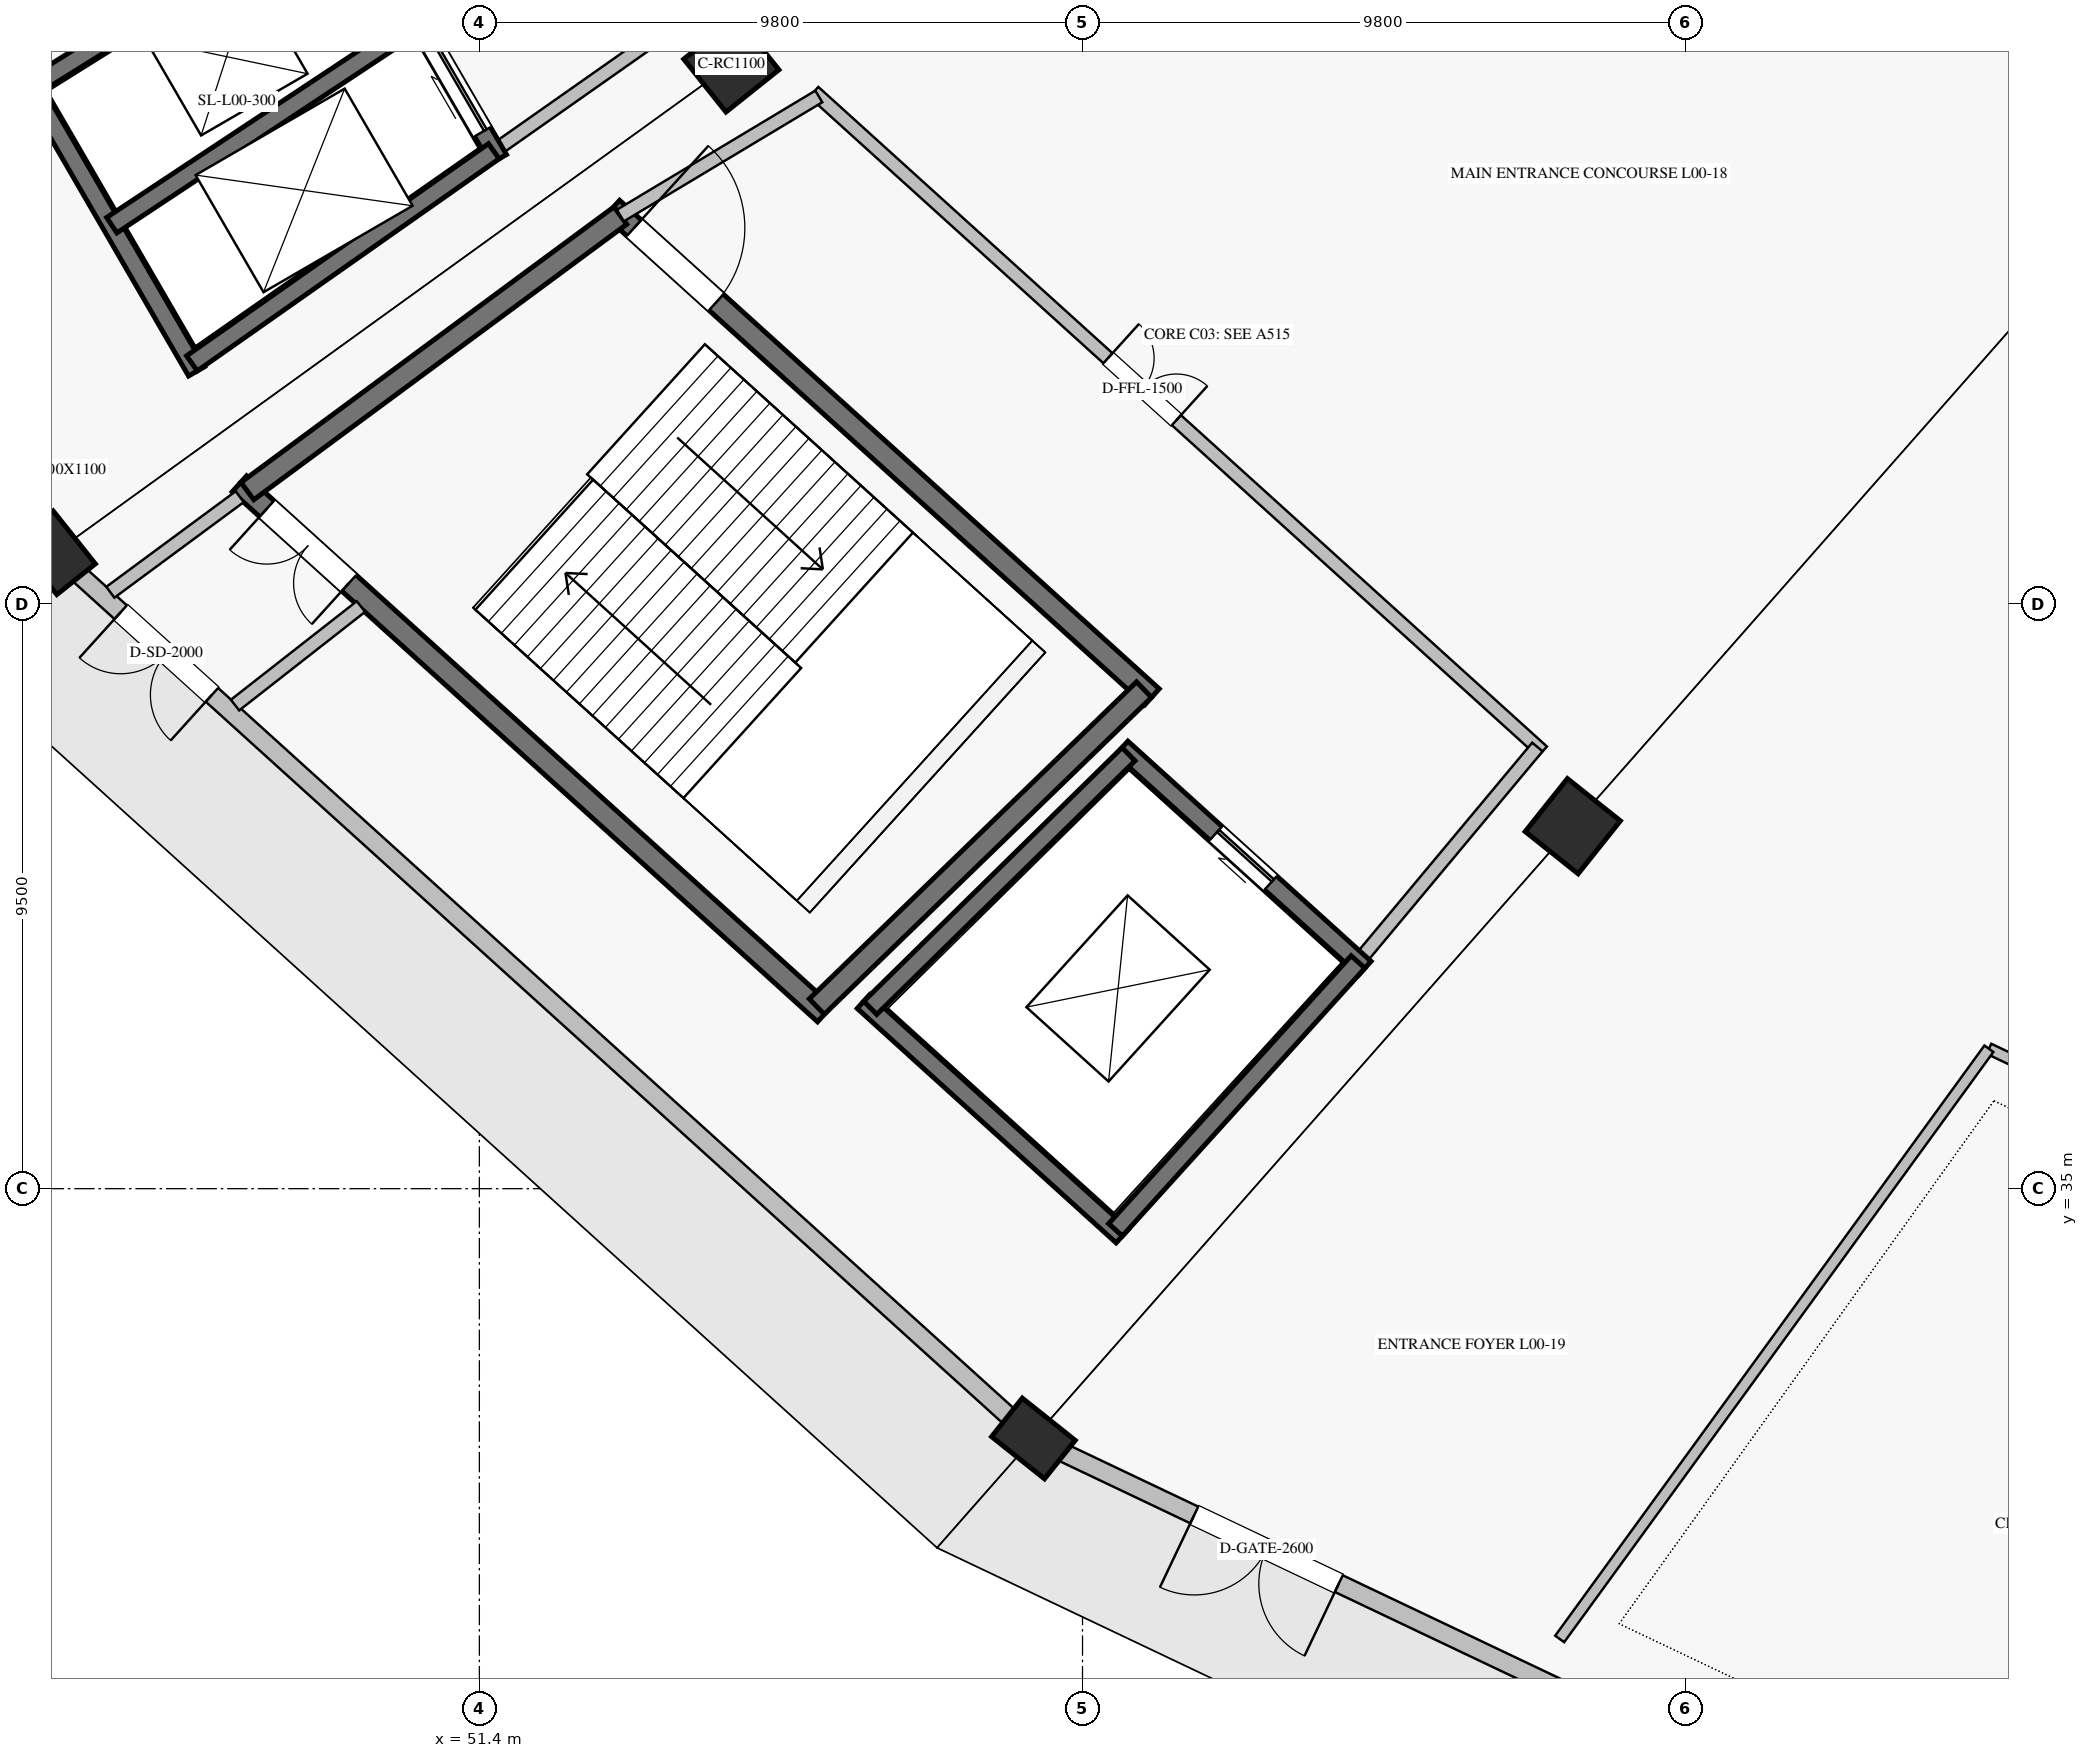
"""IFC4 building model, lengths in metres.
Left out: names, types, materials, properties, quantities, classifications, styles, units other than length and angle.
Written with IfcOpenShell. Run it as: python <this file> out.ifc"""

import sys

from ifc_helpers import new_model, si_unit, direction, frame, frame_2d, origin, origin_2d, place, context, subcontext, project, spatial, rectangle, extrude, element, fill, save


model = new_model("IFC4")
c1 = context("Model", 3, precision=1e-05, world=origin(), true_north=direction((0.0, 1.0)))
c2 = subcontext(c1, "Body", "Model", "MODEL_VIEW")
j1 = project(units=[si_unit("LENGTHUNIT", "METRE"), si_unit("PLANEANGLEUNIT", "RADIAN")], contexts=[c1])
p1 = place(None, origin())
s1 = spatial("IfcSite", under=j1, at=p1, CompositionType="ELEMENT")
p2 = place(p1, origin())
s2 = spatial("IfcBuilding", under=s1, at=p2, CompositionType="ELEMENT")
p3 = place(p2, origin())
s3 = spatial("IfcBuildingStorey", under=s2, at=p3, CompositionType="ELEMENT", Elevation=0.0)
for number, where, z_axis, x_axis in (
    (1, (55.494, 53.266, 0.0), (0.0, 0.0, 1.0), (-0.782, -0.623, 0.0)),
    (2, (69.166, 40.889, 0.0), (0.0, 0.0, 1.0), (-0.623, -0.782, 0.0)),
):
    element("IfcColumn", number, at=place(p3, frame(where, z_axis=z_axis, x_axis=x_axis)), inside=s3, PredefinedType="COLUMN", context=c2, shape_type="SweptSolid", body=[
        extrude(rectangle(XDim=1.1, YDim=1.1, at=origin_2d()), origin(), (0.0, 0.0, 1.0), 5.78),
    ])
for number, where, z_axis, x_axis in (
    (3, (44.505, 45.332, 0.0), (0.0, 0.0, 1.0), (-0.782, -0.623, 0.0)),
    (4, (60.402, 30.941, 0.0), (0.0, 0.0, 1.0), (-0.623, -0.782, 0.0)),
):
    element("IfcColumn", number, at=place(p3, frame(where, z_axis=z_axis, x_axis=x_axis)), inside=s3, PredefinedType="COLUMN", context=c2, shape_type="SweptSolid", body=[
        extrude(rectangle(XDim=0.8, YDim=1.1, at=origin_2d()), origin(), (0.0, 0.0, 1.0), 5.78),
    ])
p4 = place(p3, frame((44.794, 45.071, 0.0), z_axis=(0.0, 0.0, 1.0), x_axis=(0.741354093053, -0.671114080253, 0.0)))
e5 = element("IfcWall", 5, at=p4, inside=s3, PredefinedType="SOLIDWALL", context=c2, shape_type="SweptSolid", body=[
    extrude(rectangle(XDim=20.664, YDim=0.3, at=frame_2d((10.332, 0.0))), origin(), (0.0, 0.0, 1.0), 4.8),
])
p5 = place(p4, frame((1.05, 0.0, 0.0)))
e6 = element("IfcOpeningElement", 6, at=p5, cuts=e5, PredefinedType="OPENING", context=c2, shape_type="SweptSolid", body=[
    extrude(rectangle(XDim=2.0, YDim=2.3, at=frame_2d((1.0, 1.15))), frame((0.0, 0.16, 0.0), z_axis=(0.0, -1.0, 0.0), x_axis=(1.0, 0.0, 0.0)), (0.0, 0.0, 1.0), 0.32),
])
p6 = place(p3, frame((60.754, 30.774, 0.0), z_axis=(0.0, 0.0, 1.0), x_axis=(0.903214032263, -0.429190414528, 0.0)))
e7 = element("IfcWall", 7, at=p6, inside=s3, PredefinedType="SOLIDWALL", context=c2, shape_type="SweptSolid", body=[
    extrude(rectangle(XDim=21.134, YDim=0.3, at=frame_2d((10.567, 0.0))), origin(), (0.0, 0.0, 1.0), 4.8),
])
p7 = place(p6, frame((2.504, 0.0, 0.0)))
e8 = element("IfcOpeningElement", 8, at=p7, cuts=e7, PredefinedType="OPENING", context=c2, shape_type="SweptSolid", body=[
    extrude(rectangle(XDim=2.6, YDim=2.4, at=frame_2d((1.3, 1.2))), frame((0.0, 0.16, 0.0), z_axis=(0.0, -1.0, 0.0), x_axis=(1.0, 0.0, 0.0)), (0.0, 0.0, 1.0), 0.32),
])
p8 = place(p6, frame((13.894, 0.0, 1.1)))
e9 = element("IfcOpeningElement", 9, at=p8, cuts=e7, PredefinedType="OPENING", context=c2, shape_type="SweptSolid", body=[
    extrude(rectangle(XDim=1.8, YDim=1.5, at=frame_2d((0.9, 0.75))), frame((0.0, 0.16, 0.0), z_axis=(0.0, -1.0, 0.0), x_axis=(1.0, 0.0, 0.0)), (0.0, 0.0, 1.0), 0.32),
])
p9 = place(p3, frame((49.739, 57.046, 0.0), z_axis=(0.0, 0.0, 1.0), x_axis=(-0.852334575619, -0.522996913188, 0.0)))
e10 = element("IfcWall", 10, at=p9, inside=s3, PredefinedType="SHEAR", context=c2, shape_type="SweptSolid", body=[
    extrude(rectangle(XDim=7.516, YDim=0.35, at=frame_2d((3.758, 0.0))), origin(), (0.0, 0.0, 1.0), 5.5),
])
p10 = place(p3, frame((49.123, 56.188, 0.0), z_axis=(0.0, 0.0, 1.0), x_axis=(0.501629534056, -0.86508254552, 0.0)))
e11 = element("IfcWall", 11, at=p10, inside=s3, PredefinedType="SHEAR", context=c2, shape_type="SweptSolid", body=[
    extrude(rectangle(XDim=5.157, YDim=0.3, at=frame_2d((2.579, 0.0))), origin(), (0.0, 0.0, 1.0), 5.5),
])
p11 = place(p10, frame((0.766, 0.0, 0.0)))
e12 = element("IfcOpeningElement", 12, at=p11, cuts=e11, PredefinedType="OPENING", context=c2, shape_type="SweptSolid", body=[
    extrude(rectangle(XDim=1.1, YDim=2.2, at=frame_2d((0.55, 1.1))), frame((0.0, 0.16, 0.0), z_axis=(0.0, -1.0, 0.0), x_axis=(1.0, 0.0, 0.0)), (0.0, 0.0, 1.0), 0.32),
])
p12 = place(p10, frame((3.042, 0.0, 0.0)))
e13 = element("IfcOpeningElement", 13, at=p12, cuts=e11, PredefinedType="OPENING", context=c2, shape_type="SweptSolid", body=[
    extrude(rectangle(XDim=1.6, YDim=2.3, at=frame_2d((0.8, 1.15))), frame((0.0, 0.16, 0.0), z_axis=(0.0, -1.0, 0.0), x_axis=(1.0, 0.0, 0.0)), (0.0, 0.0, 1.0), 0.32),
])
p13 = place(p3, frame((44.05, 53.03, 0.0), z_axis=(0.0, 0.0, 1.0), x_axis=(0.501596987756, -0.865101417103, 0.0)))
e14 = element("IfcWall", 14, at=p13, inside=s3, PredefinedType="SHEAR", context=c2, shape_type="SweptSolid", body=[
    extrude(rectangle(XDim=5.491, YDim=0.3, at=frame_2d((2.746, 0.0))), origin(), (0.0, 0.0, 1.0), 5.5),
])
p14 = place(p3, frame((49.198, 56.058, 0.0), z_axis=(0.0, 0.0, 1.0), x_axis=(-0.848938067893, -0.528492343257, 0.0)))
e15 = element("IfcWall", 15, at=p14, inside=s3, PredefinedType="SHEAR", context=c2, shape_type="SweptSolid", body=[
    extrude(rectangle(XDim=5.975, YDim=0.3, at=frame_2d((2.988, 0.0))), origin(), (0.0, 0.0, 1.0), 5.5),
])
p15 = place(p3, frame((51.635, 51.855, 0.0), z_axis=(0.0, 0.0, 1.0), x_axis=(-0.818205158105, -0.574926359851, 0.0)))
e16 = element("IfcWall", 16, at=p15, inside=s3, PredefinedType="SHEAR", context=c2, shape_type="SweptSolid", body=[
    extrude(rectangle(XDim=5.995, YDim=0.3, at=frame_2d((2.998, 0.0))), origin(), (0.0, 0.0, 1.0), 5.5),
])
p16 = place(p3, frame((50.417, 53.957, 0.0), z_axis=(0.0, 0.0, 1.0), x_axis=(-0.833878900042, -0.551947443209, 0.0)))
e17 = element("IfcWall", 17, at=p16, inside=s3, PredefinedType="SHEAR", context=c2, shape_type="SweptSolid", body=[
    extrude(rectangle(XDim=5.983, YDim=0.3, at=frame_2d((2.991, 0.0))), origin(), (0.0, 0.0, 1.0), 5.5),
])
p17 = place(p3, frame((54.8, 54.079, 0.0), z_axis=(0.0, 0.0, 1.0), x_axis=(-0.818225400643, -0.574897550649, 0.0)))
e18 = element("IfcWall", 18, at=p17, inside=s3, PredefinedType="SOLIDWALL", context=c2, shape_type="SweptSolid", body=[
    extrude(rectangle(XDim=3.868, YDim=0.22, at=frame_2d((1.934, 0.0))), origin(), (0.0, 0.0, 1.0), 5.5),
])
p18 = place(p3, frame((53.561, 50.928, 0.0), z_axis=(0.0, 0.0, 1.0), x_axis=(0.741358227035, -0.671109513572, 0.0)))
e19 = element("IfcWall", 19, at=p18, inside=s3, PredefinedType="SHEAR", context=c2, shape_type="SweptSolid", body=[
    extrude(rectangle(XDim=11.827, YDim=0.35, at=frame_2d((5.913, 0.0))), origin(), (0.0, 0.0, 1.0), 5.5),
])
p19 = place(p18, frame((0.475, 0.0, 0.0)))
e20 = element("IfcOpeningElement", 20, at=p19, cuts=e19, PredefinedType="OPENING", context=c2, shape_type="SweptSolid", body=[
    extrude(rectangle(XDim=1.8, YDim=2.2, at=frame_2d((0.9, 1.1))), frame((0.0, 0.185, 0.0), z_axis=(0.0, -1.0, 0.0), x_axis=(1.0, 0.0, 0.0)), (0.0, 0.0, 1.0), 0.37),
])
p20 = place(p3, frame((47.501, 46.452, 0.0), z_axis=(0.0, 0.0, 1.0), x_axis=(0.741351373721, -0.671117084183, 0.0)))
e21 = element("IfcWall", 21, at=p20, inside=s3, PredefinedType="SHEAR", context=c2, shape_type="SweptSolid", body=[
    extrude(rectangle(XDim=12.83, YDim=0.35, at=frame_2d((6.415, 0.0))), origin(), (0.0, 0.0, 1.0), 5.5),
])
p21 = place(p20, frame((0.602, 0.0, 0.0)))
e22 = element("IfcOpeningElement", 22, at=p21, cuts=e21, PredefinedType="OPENING", context=c2, shape_type="SweptSolid", body=[
    extrude(rectangle(XDim=1.8, YDim=2.2, at=frame_2d((0.9, 1.1))), frame((0.0, 0.185, 0.0), z_axis=(0.0, -1.0, 0.0), x_axis=(1.0, 0.0, 0.0)), (0.0, 0.0, 1.0), 0.37),
])
p22 = place(p3, frame((47.506, 46.242, 0.0), z_axis=(0.0, 0.0, 1.0), x_axis=(-0.804407162525, -0.59407837604, 0.0)))
e23 = element("IfcWall", 23, at=p22, inside=s3, PredefinedType="SOLIDWALL", context=c2, shape_type="SweptSolid", body=[
    extrude(rectangle(XDim=2.613, YDim=0.22, at=frame_2d((1.306, 0.0))), origin(), (0.0, 0.0, 1.0), 5.5),
])
p23 = place(p3, frame((49.476, 44.458, 0.0), z_axis=(0.0, 0.0, 1.0), x_axis=(-0.787481201748, -0.616338670613, 0.0)))
e24 = element("IfcWall", 24, at=p23, inside=s3, PredefinedType="SOLIDWALL", context=c2, shape_type="SweptSolid", body=[
    extrude(rectangle(XDim=2.598, YDim=0.22, at=frame_2d((1.299, 0.0))), origin(), (0.0, 0.0, 1.0), 5.5),
])
p24 = place(p3, frame((53.691, 50.811, 0.0), z_axis=(0.0, 0.0, 1.0), x_axis=(-0.804395625347, -0.594093997548, 0.0)))
e25 = element("IfcWall", 25, at=p24, inside=s3, PredefinedType="SHEAR", context=c2, shape_type="SweptSolid", body=[
    extrude(rectangle(XDim=7.534, YDim=0.35, at=frame_2d((3.767, 0.0))), origin(), (0.0, 0.0, 1.0), 5.5),
])
p25 = place(p3, frame((62.199, 43.108, 0.0), z_axis=(0.0, 0.0, 1.0), x_axis=(-0.718297398554, -0.69573619083, 0.0)))
e26 = element("IfcWall", 26, at=p25, inside=s3, PredefinedType="SHEAR", context=c2, shape_type="SweptSolid", body=[
    extrude(rectangle(XDim=7.402, YDim=0.35, at=frame_2d((3.701, 0.0))), origin(), (0.0, 0.0, 1.0), 5.5),
])
p26 = place(p3, frame((61.837, 42.159, 0.0), z_axis=(0.0, 0.0, 1.0), x_axis=(0.741350155641, -0.671118429736, 0.0)))
e27 = element("IfcWall", 27, at=p26, inside=s3, PredefinedType="SHEAR", context=c2, shape_type="SweptSolid", body=[
    extrude(rectangle(XDim=5.329, YDim=0.3, at=frame_2d((2.665, 0.0))), origin(), (0.0, 0.0, 1.0), 5.5),
])
p27 = place(p26, frame((2.065, 0.0, 0.0)))
e28 = element("IfcOpeningElement", 28, at=p27, cuts=e27, PredefinedType="OPENING", context=c2, shape_type="SweptSolid", body=[
    extrude(rectangle(XDim=1.2, YDim=2.2, at=frame_2d((0.6, 1.1))), frame((0.0, 0.16, 0.0), z_axis=(0.0, -1.0, 0.0), x_axis=(1.0, 0.0, 0.0)), (0.0, 0.0, 1.0), 0.32),
])
p28 = place(p3, frame((57.64, 38.039, 0.0), z_axis=(0.0, 0.0, 1.0), x_axis=(0.74134208775, -0.671127341815, 0.0)))
e29 = element("IfcWall", 29, at=p28, inside=s3, PredefinedType="SHEAR", context=c2, shape_type="SweptSolid", body=[
    extrude(rectangle(XDim=5.675, YDim=0.3, at=frame_2d((2.837, 0.0))), origin(), (0.0, 0.0, 1.0), 5.5),
])
p29 = place(p3, frame((61.948, 42.059, 0.0), z_axis=(0.0, 0.0, 1.0), x_axis=(-0.713553028001, -0.700601224828, 0.0)))
e30 = element("IfcWall", 30, at=p29, inside=s3, PredefinedType="SHEAR", context=c2, shape_type="SweptSolid", body=[
    extrude(rectangle(XDim=5.881, YDim=0.3, at=frame_2d((2.94, 0.0))), origin(), (0.0, 0.0, 1.0), 5.5),
])
p30 = place(p3, frame((65.676, 38.684, 0.0), z_axis=(0.0, 0.0, 1.0), x_axis=(-0.67115829282, -0.741314067031, 0.0)))
e31 = element("IfcWall", 31, at=p30, inside=s3, PredefinedType="SHEAR", context=c2, shape_type="SweptSolid", body=[
    extrude(rectangle(XDim=5.871, YDim=0.3, at=frame_2d((2.935, 0.0))), origin(), (0.0, 0.0, 1.0), 5.5),
])
p31 = place(p3, frame((56.834, 52.819, 0.0), z_axis=(0.0, 0.0, 1.0), x_axis=(0.741351035574, -0.671117457717, 0.0)))
e32 = element("IfcWall", 32, at=p31, inside=s3, PredefinedType="SOLIDWALL", context=c2, shape_type="SweptSolid", body=[
    extrude(rectangle(XDim=15.969, YDim=0.22, at=frame_2d((7.985, 0.0))), origin(), (0.0, 0.0, 1.0), 5.5),
])
p32 = place(p31, frame((6.447, 0.0, 0.0)))
e33 = element("IfcOpeningElement", 33, at=p32, cuts=e32, PredefinedType="OPENING", context=c2, shape_type="SweptSolid", body=[
    extrude(rectangle(XDim=1.5, YDim=2.2, at=frame_2d((0.75, 1.1))), frame((0.0, 0.12, 0.0), z_axis=(0.0, -1.0, 0.0), x_axis=(1.0, 0.0, 0.0)), (0.0, 0.0, 1.0), 0.24),
])
p33 = place(p3, frame((56.915, 52.746, 0.0), z_axis=(0.0, 0.0, 1.0), x_axis=(-0.857424171966, -0.514610327654, 0.0)))
e34 = element("IfcWall", 34, at=p33, inside=s3, PredefinedType="SOLIDWALL", context=c2, shape_type="SweptSolid", body=[
    extrude(rectangle(XDim=3.76, YDim=0.22, at=frame_2d((1.88, 0.0))), origin(), (0.0, 0.0, 1.0), 5.5),
])
p34 = place(p3, frame((68.591, 42.176, 0.0), z_axis=(0.0, 0.0, 1.0), x_axis=(-0.640759627034, -0.767741558315, 0.0)))
e35 = element("IfcWall", 35, at=p34, inside=s3, PredefinedType="SOLIDWALL", context=c2, shape_type="SweptSolid", body=[
    extrude(rectangle(XDim=4.549, YDim=0.22, at=frame_2d((2.274, 0.0))), origin(), (0.0, 0.0, 1.0), 5.5),
])
p35 = place(p3, frame((75.927, 37.273, 0.0), z_axis=(0.0, 0.0, 1.0), x_axis=(0.903212529205, -0.42919357764, 0.0)))
e36 = element("IfcWall", 36, at=p35, inside=s3, PredefinedType="PARTITIONING", context=c2, shape_type="SweptSolid", body=[
    extrude(rectangle(XDim=10.414, YDim=0.18, at=frame_2d((5.207, 0.0))), origin(), (0.0, 0.0, 1.0), 4.82),
])
p36 = place(p35, frame((4.277, 0.0, 0.0)))
e37 = element("IfcOpeningElement", 37, at=p36, cuts=e36, PredefinedType="OPENING", context=c2, shape_type="SweptSolid", body=[
    extrude(rectangle(XDim=1.86, YDim=2.35, at=frame_2d((0.93, 1.175))), frame((0.0, 0.1, 0.0), z_axis=(0.0, -1.0, 0.0), x_axis=(1.0, 0.0, 0.0)), (0.0, 0.0, 1.0), 0.2),
])
p37 = place(p3, frame((75.927, 37.273, 0.0), z_axis=(0.0, 0.0, 1.0), x_axis=(-0.588160679051, -0.808744097733, 0.0)))
e38 = element("IfcWall", 38, at=p37, inside=s3, PredefinedType="PARTITIONING", context=c2, shape_type="SweptSolid", body=[
    extrude(rectangle(XDim=11.857, YDim=0.18, at=frame_2d((5.929, 0.0))), origin(), (0.0, 0.0, 1.0), 4.82),
])
p38 = place(p5, frame((2.0, 0.0, 0.0), z_axis=(0.0, 0.0, 1.0), x_axis=(-1.0, 0.0, 0.0)))
e39 = element("IfcDoor", 39, at=p38, inside=s3, OperationType="DOUBLE_DOOR_SINGLE_SWING", PredefinedType="DOOR", context=c2, shape_type="SweptSolid", body=[
    extrude(rectangle(XDim=2.0, YDim=2.3, at=frame_2d((1.0, 1.15))), frame((0.0, 0.025, 0.0), z_axis=(0.0, -1.0, 0.0), x_axis=(1.0, 0.0, 0.0)), (0.0, 0.0, 1.0), 0.05),
])
fill(e6, e39)
p39 = place(p7, frame((2.6, 0.0, 0.0), z_axis=(0.0, 0.0, 1.0), x_axis=(-1.0, 0.0, 0.0)))
e40 = element("IfcDoor", 40, at=p39, inside=s3, OperationType="DOUBLE_DOOR_SINGLE_SWING", PredefinedType="DOOR", context=c2, shape_type="SweptSolid", body=[
    extrude(rectangle(XDim=2.6, YDim=2.4, at=frame_2d((1.3, 1.2))), frame((0.0, 0.025, 0.0), z_axis=(0.0, -1.0, 0.0), x_axis=(1.0, 0.0, 0.0)), (0.0, 0.0, 1.0), 0.05),
])
fill(e8, e40)
p40 = place(p12, origin())
e41 = element("IfcDoor", 41, at=p40, inside=s3, OperationType="SLIDING_TO_LEFT", PredefinedType="DOOR", context=c2, shape_type="SweptSolid", body=[
    extrude(rectangle(XDim=1.6, YDim=2.3, at=frame_2d((0.8, 1.15))), frame((0.0, 0.025, 0.0), z_axis=(0.0, -1.0, 0.0), x_axis=(1.0, 0.0, 0.0)), (0.0, 0.0, 1.0), 0.05),
])
fill(e13, e41)
p41 = place(p21, frame((1.8, 0.0, 0.0), z_axis=(0.0, 0.0, 1.0), x_axis=(-1.0, 0.0, 0.0)))
e42 = element("IfcDoor", 42, at=p41, inside=s3, OperationType="DOUBLE_DOOR_SINGLE_SWING", PredefinedType="DOOR", context=c2, shape_type="SweptSolid", body=[
    extrude(rectangle(XDim=1.8, YDim=2.2, at=frame_2d((0.9, 1.1))), frame((0.0, 0.025, 0.0), z_axis=(0.0, -1.0, 0.0), x_axis=(1.0, 0.0, 0.0)), (0.0, 0.0, 1.0), 0.05),
])
fill(e22, e42)
p42 = place(p19, origin())
e43 = element("IfcDoor", 43, at=p42, inside=s3, OperationType="SINGLE_SWING_LEFT", PredefinedType="DOOR", context=c2, shape_type="SweptSolid", body=[
    extrude(rectangle(XDim=1.8, YDim=2.2, at=frame_2d((0.9, 1.1))), frame((0.0, 0.025, 0.0), z_axis=(0.0, -1.0, 0.0), x_axis=(1.0, 0.0, 0.0)), (0.0, 0.0, 1.0), 0.05),
])
fill(e20, e43)
p43 = place(p27, origin())
e44 = element("IfcDoor", 44, at=p43, inside=s3, OperationType="SLIDING_TO_LEFT", PredefinedType="DOOR", context=c2, shape_type="SweptSolid", body=[
    extrude(rectangle(XDim=1.2, YDim=2.2, at=frame_2d((0.6, 1.1))), frame((0.0, 0.025, 0.0), z_axis=(0.0, -1.0, 0.0), x_axis=(1.0, 0.0, 0.0)), (0.0, 0.0, 1.0), 0.05),
])
fill(e28, e44)
p44 = place(p32, origin())
e45 = element("IfcDoor", 45, at=p44, inside=s3, OperationType="DOUBLE_DOOR_SINGLE_SWING", PredefinedType="DOOR", context=c2, shape_type="SweptSolid", body=[
    extrude(rectangle(XDim=1.5, YDim=2.2, at=frame_2d((0.75, 1.1))), frame((0.0, 0.025, 0.0), z_axis=(0.0, -1.0, 0.0), x_axis=(1.0, 0.0, 0.0)), (0.0, 0.0, 1.0), 0.05),
])
fill(e33, e45)
save(model, sys.argv[1])
